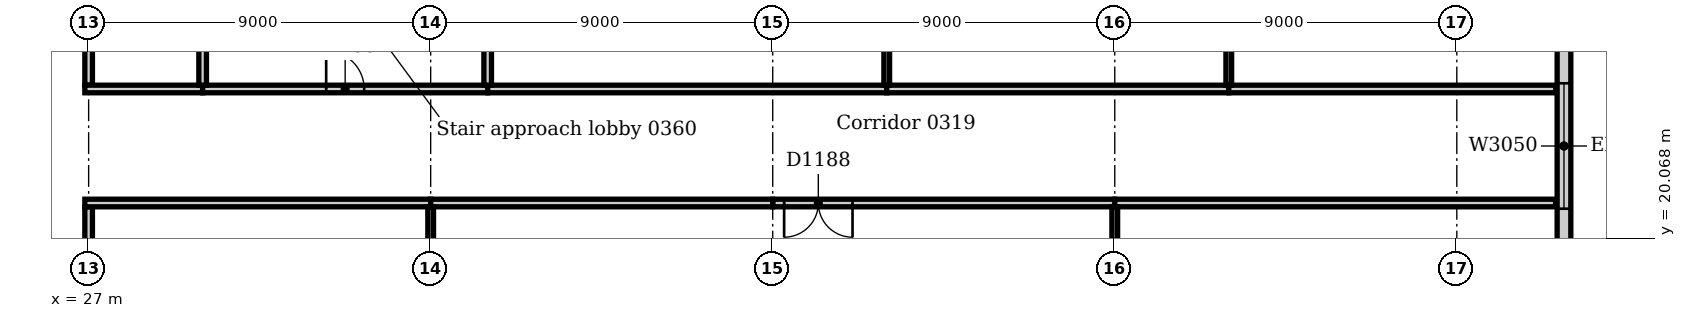
"""IFC4 building model, lengths in metres.
Left out: names, types, materials, properties, quantities, classifications, styles, units other than length and angle.
Written with IfcOpenShell. Run it as: python <this file> out.ifc"""

import sys

from ifc_helpers import new_model, si_unit, direction, frame, frame_2d, origin, place, context, subcontext, project, spatial, rectangle, extrude, element, fill, save


model = new_model("IFC4")
c1 = context("Model", 3, precision=1e-05, world=origin(), true_north=direction((0.0, 1.0)))
c2 = subcontext(c1, "Body", "Model", "MODEL_VIEW")
j1 = project(units=[si_unit("LENGTHUNIT", "METRE"), si_unit("PLANEANGLEUNIT", "RADIAN")], contexts=[c1])
p1 = place(None, origin())
s1 = spatial("IfcSite", under=j1, at=p1, CompositionType="ELEMENT")
p2 = place(p1, origin())
s2 = spatial("IfcBuilding", under=s1, at=p2, CompositionType="ELEMENT")
p3 = place(p2, frame((0.0, 0.0, 16.0)))
s3 = spatial("IfcBuildingStorey", under=s2, at=p3, CompositionType="ELEMENT", Elevation=16.0)
p4 = place(p3, frame((65.82, -9.0, 0.0), z_axis=(0.0, 0.0, 1.0), x_axis=(0.0, 1.0, 0.0)))
e1 = element("IfcWall", 1, at=p4, inside=s3, PredefinedType="STANDARD", context=c2, shape_type="SweptSolid", body=[
    extrude(rectangle(XDim=63.0, YDim=0.36, at=frame_2d((31.5, 0.0))), origin(), (0.0, 0.0, 1.0), 4.7),
])
p5 = place(p4, frame((2.85, 0.0, 0.9)))
e2 = element("IfcOpeningElement", 2, at=p5, cuts=e1, PredefinedType="OPENING", context=c2, shape_type="SweptSolid", body=[
    extrude(rectangle(XDim=3.3, YDim=2.4, at=frame_2d((1.65, 1.2))), frame((0.0, 0.19, 0.0), z_axis=(0.0, -1.0, 0.0), x_axis=(1.0, 0.0, 0.0)), (0.0, 0.0, 1.0), 0.38),
])
p6 = place(p4, frame((7.35, 0.0, 0.9)))
e3 = element("IfcOpeningElement", 3, at=p6, cuts=e1, PredefinedType="OPENING", context=c2, shape_type="SweptSolid", body=[
    extrude(rectangle(XDim=3.3, YDim=2.4, at=frame_2d((1.65, 1.2))), frame((0.0, 0.19, 0.0), z_axis=(0.0, -1.0, 0.0), x_axis=(1.0, 0.0, 0.0)), (0.0, 0.0, 1.0), 0.38),
])
p7 = place(p4, frame((11.85, 0.0, 0.9)))
e4 = element("IfcOpeningElement", 4, at=p7, cuts=e1, PredefinedType="OPENING", context=c2, shape_type="SweptSolid", body=[
    extrude(rectangle(XDim=3.3, YDim=2.4, at=frame_2d((1.65, 1.2))), frame((0.0, 0.19, 0.0), z_axis=(0.0, -1.0, 0.0), x_axis=(1.0, 0.0, 0.0)), (0.0, 0.0, 1.0), 0.38),
])
p8 = place(p4, frame((16.35, 0.0, 0.9)))
e5 = element("IfcOpeningElement", 5, at=p8, cuts=e1, PredefinedType="OPENING", context=c2, shape_type="SweptSolid", body=[
    extrude(rectangle(XDim=3.3, YDim=2.4, at=frame_2d((1.65, 1.2))), frame((0.0, 0.19, 0.0), z_axis=(0.0, -1.0, 0.0), x_axis=(1.0, 0.0, 0.0)), (0.0, 0.0, 1.0), 0.38),
])
p9 = place(p4, frame((20.85, 0.0, 0.9)))
e6 = element("IfcOpeningElement", 6, at=p9, cuts=e1, PredefinedType="OPENING", context=c2, shape_type="SweptSolid", body=[
    extrude(rectangle(XDim=3.3, YDim=2.4, at=frame_2d((1.65, 1.2))), frame((0.0, 0.19, 0.0), z_axis=(0.0, -1.0, 0.0), x_axis=(1.0, 0.0, 0.0)), (0.0, 0.0, 1.0), 0.38),
])
p10 = place(p4, frame((25.35, 0.0, 0.9)))
e7 = element("IfcOpeningElement", 7, at=p10, cuts=e1, PredefinedType="OPENING", context=c2, shape_type="SweptSolid", body=[
    extrude(rectangle(XDim=3.3, YDim=2.4, at=frame_2d((1.65, 1.2))), frame((0.0, 0.19, 0.0), z_axis=(0.0, -1.0, 0.0), x_axis=(1.0, 0.0, 0.0)), (0.0, 0.0, 1.0), 0.38),
])
p11 = place(p4, frame((29.85, 0.0, 0.9)))
e8 = element("IfcOpeningElement", 8, at=p11, cuts=e1, PredefinedType="OPENING", context=c2, shape_type="SweptSolid", body=[
    extrude(rectangle(XDim=3.3, YDim=2.4, at=frame_2d((1.65, 1.2))), frame((0.0, 0.19, 0.0), z_axis=(0.0, -1.0, 0.0), x_axis=(1.0, 0.0, 0.0)), (0.0, 0.0, 1.0), 0.38),
])
p12 = place(p4, frame((34.35, 0.0, 0.9)))
e9 = element("IfcOpeningElement", 9, at=p12, cuts=e1, PredefinedType="OPENING", context=c2, shape_type="SweptSolid", body=[
    extrude(rectangle(XDim=3.3, YDim=2.4, at=frame_2d((1.65, 1.2))), frame((0.0, 0.19, 0.0), z_axis=(0.0, -1.0, 0.0), x_axis=(1.0, 0.0, 0.0)), (0.0, 0.0, 1.0), 0.38),
])
p13 = place(p4, frame((38.85, 0.0, 0.9)))
e10 = element("IfcOpeningElement", 10, at=p13, cuts=e1, PredefinedType="OPENING", context=c2, shape_type="SweptSolid", body=[
    extrude(rectangle(XDim=3.3, YDim=2.4, at=frame_2d((1.65, 1.2))), frame((0.0, 0.19, 0.0), z_axis=(0.0, -1.0, 0.0), x_axis=(1.0, 0.0, 0.0)), (0.0, 0.0, 1.0), 0.38),
])
p14 = place(p4, frame((43.35, 0.0, 0.9)))
e11 = element("IfcOpeningElement", 11, at=p14, cuts=e1, PredefinedType="OPENING", context=c2, shape_type="SweptSolid", body=[
    extrude(rectangle(XDim=3.3, YDim=2.4, at=frame_2d((1.65, 1.2))), frame((0.0, 0.19, 0.0), z_axis=(0.0, -1.0, 0.0), x_axis=(1.0, 0.0, 0.0)), (0.0, 0.0, 1.0), 0.38),
])
p15 = place(p4, frame((47.85, 0.0, 0.9)))
e12 = element("IfcOpeningElement", 12, at=p15, cuts=e1, PredefinedType="OPENING", context=c2, shape_type="SweptSolid", body=[
    extrude(rectangle(XDim=3.3, YDim=2.4, at=frame_2d((1.65, 1.2))), frame((0.0, 0.19, 0.0), z_axis=(0.0, -1.0, 0.0), x_axis=(1.0, 0.0, 0.0)), (0.0, 0.0, 1.0), 0.38),
])
p16 = place(p4, frame((52.35, 0.0, 0.9)))
e13 = element("IfcOpeningElement", 13, at=p16, cuts=e1, PredefinedType="OPENING", context=c2, shape_type="SweptSolid", body=[
    extrude(rectangle(XDim=3.3, YDim=2.4, at=frame_2d((1.65, 1.2))), frame((0.0, 0.19, 0.0), z_axis=(0.0, -1.0, 0.0), x_axis=(1.0, 0.0, 0.0)), (0.0, 0.0, 1.0), 0.38),
])
p17 = place(p4, frame((56.85, 0.0, 0.9)))
e14 = element("IfcOpeningElement", 14, at=p17, cuts=e1, PredefinedType="OPENING", context=c2, shape_type="SweptSolid", body=[
    extrude(rectangle(XDim=3.3, YDim=2.4, at=frame_2d((1.65, 1.2))), frame((0.0, 0.19, 0.0), z_axis=(0.0, -1.0, 0.0), x_axis=(1.0, 0.0, 0.0)), (0.0, 0.0, 1.0), 0.38),
])
for number, where, z_axis, x_axis in (
    (15, (27.0, 18.52, 0.0), (0.0, 0.0, 1.0), (0.0, 1.0, 0.0)),
    (16, (27.0, 24.1, 0.0), (0.0, 0.0, 1.0), (0.0, 1.0, 0.0)),
):
    element("IfcWall", number, at=place(p3, frame(where, z_axis=z_axis, x_axis=x_axis)), inside=s3, PredefinedType="PARTITIONING", context=c2, shape_type="SweptSolid", body=[
        extrude(rectangle(XDim=2.38, YDim=0.2, at=frame_2d((1.19, 0.0))), origin(), (0.0, 0.0, 1.0), 4.7),
    ])
p18 = place(p3, frame((26.9, 21.0, 0.0), z_axis=(0.0, 0.0, 1.0), x_axis=(1.0, 0.0, 0.0)))
e17 = element("IfcWall", 17, at=p18, inside=s3, PredefinedType="PARTITIONING", context=c2, shape_type="SweptSolid", body=[
    extrude(rectangle(XDim=9.1, YDim=0.2, at=frame_2d((4.55, 0.0))), origin(), (0.0, 0.0, 1.0), 4.7),
])
p19 = place(p3, frame((45.0, 21.0, 0.0), z_axis=(0.0, 0.0, 1.0), x_axis=(1.0, 0.0, 0.0)))
e18 = element("IfcWall", 18, at=p19, inside=s3, PredefinedType="PARTITIONING", context=c2, shape_type="SweptSolid", body=[
    extrude(rectangle(XDim=9.0, YDim=0.2, at=frame_2d((4.5, 0.0))), origin(), (0.0, 0.0, 1.0), 4.7),
])
p20 = place(p19, frame((0.3, 0.0, 0.0)))
e19 = element("IfcOpeningElement", 19, at=p20, cuts=e18, PredefinedType="OPENING", context=c2, shape_type="SweptSolid", body=[
    extrude(rectangle(XDim=1.8, YDim=2.1, at=frame_2d((0.9, 1.05))), frame((0.0, 0.11, 0.0), z_axis=(0.0, -1.0, 0.0), x_axis=(1.0, 0.0, 0.0)), (0.0, 0.0, 1.0), 0.22),
])
p21 = place(p3, frame((36.0, 21.0, 0.0), z_axis=(0.0, 0.0, 1.0), x_axis=(1.0, 0.0, 0.0)))
e20 = element("IfcWall", 20, at=p21, inside=s3, PredefinedType="PARTITIONING", context=c2, shape_type="SweptSolid", body=[
    extrude(rectangle(XDim=9.0, YDim=0.2, at=frame_2d((4.5, 0.0))), origin(), (0.0, 0.0, 1.0), 4.7),
])
p22 = place(p3, frame((54.0, 21.0, 0.0), z_axis=(0.0, 0.0, 1.0), x_axis=(1.0, 0.0, 0.0)))
e21 = element("IfcWall", 21, at=p22, inside=s3, PredefinedType="PARTITIONING", context=c2, shape_type="SweptSolid", body=[
    extrude(rectangle(XDim=11.6, YDim=0.2, at=frame_2d((5.8, 0.0))), origin(), (0.0, 0.0, 1.0), 4.7),
])
p23 = place(p3, frame((26.9, 24.0, 0.0), z_axis=(0.0, 0.0, 1.0), x_axis=(1.0, 0.0, 0.0)))
e22 = element("IfcWall", 22, at=p23, inside=s3, PredefinedType="PARTITIONING", context=c2, shape_type="SweptSolid", body=[
    extrude(rectangle(XDim=3.1, YDim=0.2, at=frame_2d((1.55, 0.0))), origin(), (0.0, 0.0, 1.0), 4.7),
])
p24 = place(p3, frame((30.0, 24.0, 0.0), z_axis=(0.0, 0.0, 1.0), x_axis=(1.0, 0.0, 0.0)))
e23 = element("IfcWall", 23, at=p24, inside=s3, PredefinedType="PARTITIONING", context=c2, shape_type="SweptSolid", body=[
    extrude(rectangle(XDim=7.5, YDim=0.2, at=frame_2d((3.75, 0.0))), origin(), (0.0, 0.0, 1.0), 4.7),
])
p25 = place(p24, frame((3.25, 0.0, 0.0)))
e24 = element("IfcOpeningElement", 24, at=p25, cuts=e23, PredefinedType="OPENING", context=c2, shape_type="SweptSolid", body=[
    extrude(rectangle(XDim=1.0, YDim=2.1, at=frame_2d((0.5, 1.05))), frame((0.0, 0.11, 0.0), z_axis=(0.0, -1.0, 0.0), x_axis=(1.0, 0.0, 0.0)), (0.0, 0.0, 1.0), 0.22),
])
p26 = place(p3, frame((37.5, 24.0, 0.0), z_axis=(0.0, 0.0, 1.0), x_axis=(1.0, 0.0, 0.0)))
e25 = element("IfcWall", 25, at=p26, inside=s3, PredefinedType="PARTITIONING", context=c2, shape_type="SweptSolid", body=[
    extrude(rectangle(XDim=10.5, YDim=0.2, at=frame_2d((5.25, 0.0))), origin(), (0.0, 0.0, 1.0), 4.7),
])
p27 = place(p3, frame((48.0, 24.0, 0.0), z_axis=(0.0, 0.0, 1.0), x_axis=(1.0, 0.0, 0.0)))
e26 = element("IfcWall", 26, at=p27, inside=s3, PredefinedType="PARTITIONING", context=c2, shape_type="SweptSolid", body=[
    extrude(rectangle(XDim=9.0, YDim=0.2, at=frame_2d((4.5, 0.0))), origin(), (0.0, 0.0, 1.0), 4.7),
])
p28 = place(p3, frame((57.0, 24.0, 0.0), z_axis=(0.0, 0.0, 1.0), x_axis=(1.0, 0.0, 0.0)))
e27 = element("IfcWall", 27, at=p28, inside=s3, PredefinedType="PARTITIONING", context=c2, shape_type="SweptSolid", body=[
    extrude(rectangle(XDim=8.6, YDim=0.2, at=frame_2d((4.3, 0.0))), origin(), (0.0, 0.0, 1.0), 4.7),
])
for number, where, z_axis, x_axis in (
    (28, (36.0, 18.52, 0.0), (0.0, 0.0, 1.0), (0.0, 1.0, 0.0)),
    (29, (54.0, 18.52, 0.0), (0.0, 0.0, 1.0), (0.0, 1.0, 0.0)),
):
    element("IfcWall", number, at=place(p3, frame(where, z_axis=z_axis, x_axis=x_axis)), inside=s3, PredefinedType="PARTITIONING", context=c2, shape_type="SweptSolid", body=[
        extrude(rectangle(XDim=2.38, YDim=0.15, at=frame_2d((1.19, 0.0))), origin(), (0.0, 0.0, 1.0), 4.7),
    ])
for number, where, z_axis, x_axis in (
    (30, (30.0, 24.1, 0.0), (0.0, 0.0, 1.0), (0.0, 1.0, 0.0)),
    (31, (37.5, 24.1, 0.0), (0.0, 0.0, 1.0), (0.0, 1.0, 0.0)),
):
    element("IfcWall", number, at=place(p3, frame(where, z_axis=z_axis, x_axis=x_axis)), inside=s3, PredefinedType="PARTITIONING", context=c2, shape_type="SweptSolid", body=[
        extrude(rectangle(XDim=5.15, YDim=0.2, at=frame_2d((2.575, 0.0))), origin(), (0.0, 0.0, 1.0), 4.7),
    ])
p29 = place(p3, frame((48.0, 24.1, 0.0), z_axis=(0.0, 0.0, 1.0), x_axis=(0.0, 1.0, 0.0)))
e32 = element("IfcWall", 32, at=p29, inside=s3, PredefinedType="PARTITIONING", context=c2, shape_type="SweptSolid", body=[
    extrude(rectangle(XDim=17.8, YDim=0.15, at=frame_2d((8.9, 0.0))), origin(), (0.0, 0.0, 1.0), 4.7),
])
p30 = place(p3, frame((57.0, 24.1, 0.0), z_axis=(0.0, 0.0, 1.0), x_axis=(0.0, 1.0, 0.0)))
e33 = element("IfcWall", 33, at=p30, inside=s3, PredefinedType="PARTITIONING", context=c2, shape_type="SweptSolid", body=[
    extrude(rectangle(XDim=10.678, YDim=0.15, at=frame_2d((5.339, 0.0))), origin(), (0.0, 0.0, 1.0), 4.7),
])
p31 = place(p11, origin())
e34 = element("IfcWindow", 34, at=p31, inside=s3, PartitioningType="SINGLE_PANEL", PredefinedType="WINDOW", context=c2, shape_type="SweptSolid", body=[
    extrude(rectangle(XDim=3.3, YDim=2.4, at=frame_2d((1.65, 1.2))), frame((0.0, 0.13, 0.0), z_axis=(0.0, -1.0, 0.0), x_axis=(1.0, 0.0, 0.0)), (0.0, 0.0, 1.0), 0.06),
])
fill(e8, e34)
p32 = place(p20, frame((1.8, 0.0, 0.0), z_axis=(0.0, 0.0, 1.0), x_axis=(-1.0, 0.0, 0.0)))
e35 = element("IfcDoor", 35, at=p32, inside=s3, OperationType="DOUBLE_DOOR_SINGLE_SWING", PredefinedType="DOOR", context=c2, shape_type="SweptSolid", body=[
    extrude(rectangle(XDim=1.8, YDim=2.1, at=frame_2d((0.9, 1.05))), frame((0.0, 0.025, 0.0), z_axis=(0.0, -1.0, 0.0), x_axis=(1.0, 0.0, 0.0)), (0.0, 0.0, 1.0), 0.05),
])
fill(e19, e35)
p33 = place(p25, origin())
e36 = element("IfcDoor", 36, at=p33, inside=s3, OperationType="SINGLE_SWING_LEFT", PredefinedType="DOOR", context=c2, shape_type="SweptSolid", body=[
    extrude(rectangle(XDim=1.0, YDim=2.1, at=frame_2d((0.5, 1.05))), frame((0.0, 0.025, 0.0), z_axis=(0.0, -1.0, 0.0), x_axis=(1.0, 0.0, 0.0)), (0.0, 0.0, 1.0), 0.05),
])
fill(e24, e36)
save(model, sys.argv[1])
